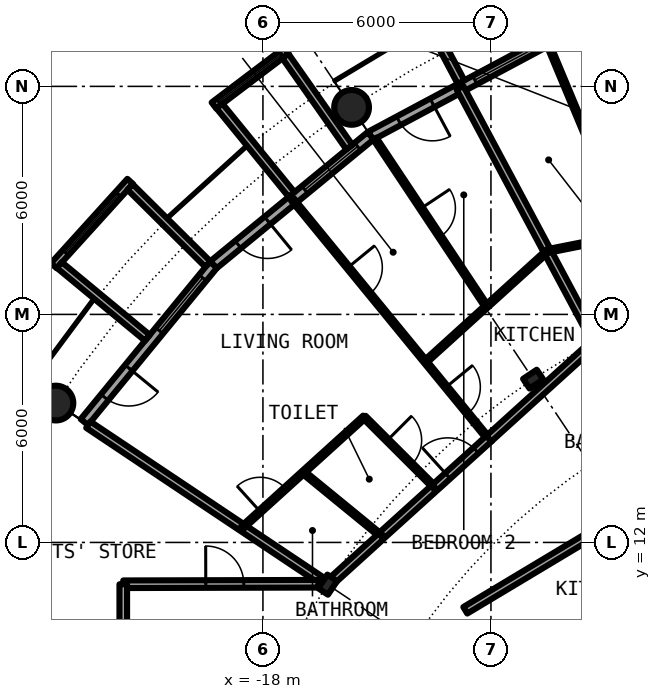
"""IFC4 building model, lengths in metres.
Left out: names, types, materials, properties, quantities, classifications, styles, units other than length and angle.
Written with IfcOpenShell. Run it as: python <this file> out.ifc"""

import sys

from ifc_helpers import new_model, si_unit, direction, frame, frame_2d, origin, origin_2d, place, context, subcontext, project, spatial, rectangle, circle, hollow_circle, i_section, extrude, element, fill, save


model = new_model("IFC4")
c1 = context("Model", 3, precision=1e-05, world=origin(), true_north=direction((0.0, 1.0)))
c2 = subcontext(c1, "Body", "Model", "MODEL_VIEW")
j1 = project(units=[si_unit("LENGTHUNIT", "METRE"), si_unit("PLANEANGLEUNIT", "RADIAN")], contexts=[c1])
p1 = place(None, origin())
s1 = spatial("IfcSite", under=j1, at=p1, CompositionType="ELEMENT")
p2 = place(p1, origin())
s2 = spatial("IfcBuilding", under=s1, at=p2, CompositionType="ELEMENT")
p3 = place(p2, frame((0.0, 0.0, 129.95)))
s3 = spatial("IfcBuildingStorey", under=s2, at=p3, CompositionType="ELEMENT", Elevation=129.95)
for number, where, z_axis, x_axis in (
    (1, (-15.667, 23.448, 0.0), (0.0, 0.0, 1.0), (1.0, 0.0, 0.0)),
    (2, (-23.448, 15.667, 0.0), (0.0, 0.0, 1.0), (1.0, 0.0, 0.0)),
):
    element("IfcColumn", number, at=place(p3, frame(where, z_axis=z_axis, x_axis=x_axis)), inside=s3, PredefinedType="COLUMN", context=c2, shape_type="SweptSolid", body=[
        extrude(hollow_circle(Radius=0.457, WallThickness=0.04, at=origin_2d()), origin(), (0.0, 0.0, 1.0), 3.05),
    ])
for number, where, z_axis, x_axis in (
    (3, (-10.889, 16.297, 0.0), (0.0, 0.0, 1.0), (-0.556, 0.831, 0.0)),
    (4, (-16.297, 10.889, 0.0), (0.0, 0.0, 1.0), (-0.831, 0.556, 0.0)),
):
    element("IfcColumn", number, at=place(p3, frame(where, z_axis=z_axis, x_axis=x_axis)), inside=s3, PredefinedType="COLUMN", context=c2, shape_type="SweptSolid", body=[
        extrude(i_section(OverallWidth=0.307, OverallDepth=0.432, WebThickness=0.021, FlangeThickness=0.04, FilletRadius=0.027, at=origin_2d()), origin(), (0.0, 0.0, 1.0), 3.05),
    ])
p4 = place(p3, frame((-10.447, 25.222, 0.0), z_axis=(0.0, 0.0, 1.0), x_axis=(-0.881915646801, -0.471407246368, 0.0)))
e5 = element("IfcWall", 5, at=p4, inside=s3, PredefinedType="SOLIDWALL", context=c2, shape_type="SweptSolid", body=[
    extrude(rectangle(XDim=5.352, YDim=0.25, at=frame_2d((2.676, 0.0))), origin(), (0.0, 0.0, 1.0), 2.7),
])
p5 = place(p4, frame((0.441, 0.0, 0.3)))
e6 = element("IfcOpeningElement", 6, at=p5, cuts=e5, PredefinedType="OPENING", context=c2, shape_type="SweptSolid", body=[
    extrude(rectangle(XDim=1.8, YDim=2.1, at=frame_2d((0.9, 1.05))), frame((0.0, 0.135, 0.0), z_axis=(0.0, -1.0, 0.0), x_axis=(1.0, 0.0, 0.0)), (0.0, 0.0, 1.0), 0.27),
])
p6 = place(p4, frame((3.51, 0.0, 0.0)))
e7 = element("IfcOpeningElement", 7, at=p6, cuts=e5, PredefinedType="OPENING", context=c2, shape_type="SweptSolid", body=[
    extrude(rectangle(XDim=1.0, YDim=2.2, at=frame_2d((0.5, 1.1))), frame((0.0, 0.135, 0.0), z_axis=(0.0, -1.0, 0.0), x_axis=(1.0, 0.0, 0.0)), (0.0, 0.0, 1.0), 0.27),
])
p7 = place(p3, frame((-12.787, 24.113, -0.03), z_axis=(0.0, 0.0, 1.0), x_axis=(-0.468365282436, 0.883534924159, 0.0)))
e8 = element("IfcWall", 8, at=p7, inside=s3, PredefinedType="SOLIDWALL", context=c2, shape_type="SweptSolid", body=[
    extrude(rectangle(XDim=3.006, YDim=0.2, at=frame_2d((1.503, 0.0))), origin(), (0.0, 0.0, 1.0), 2.73),
])
p8 = place(p3, frame((-15.167, 22.699, 0.0), z_axis=(0.0, 0.0, 1.0), x_axis=(-0.773019449054, -0.634382322723, 0.0)))
e9 = element("IfcWall", 9, at=p8, inside=s3, PredefinedType="SOLIDWALL", context=c2, shape_type="SweptSolid", body=[
    extrude(rectangle(XDim=5.352, YDim=0.25, at=frame_2d((2.676, 0.0))), origin(), (0.0, 0.0, 1.0), 2.7),
])
p9 = place(p8, frame((0.441, 0.0, 0.3)))
e10 = element("IfcOpeningElement", 10, at=p9, cuts=e9, PredefinedType="OPENING", context=c2, shape_type="SweptSolid", body=[
    extrude(rectangle(XDim=1.8, YDim=2.1, at=frame_2d((0.9, 1.05))), frame((0.0, 0.135, 0.0), z_axis=(0.0, -1.0, 0.0), x_axis=(1.0, 0.0, 0.0)), (0.0, 0.0, 1.0), 0.27),
])
p10 = place(p8, frame((3.51, 0.0, 0.0)))
e11 = element("IfcOpeningElement", 11, at=p10, cuts=e9, PredefinedType="OPENING", context=c2, shape_type="SweptSolid", body=[
    extrude(rectangle(XDim=1.0, YDim=2.2, at=frame_2d((0.5, 1.1))), frame((0.0, 0.135, 0.0), z_axis=(0.0, -1.0, 0.0), x_axis=(1.0, 0.0, 0.0)), (0.0, 0.0, 1.0), 0.27),
])
p11 = place(p3, frame((-17.382, 24.94, -0.03), z_axis=(0.0, 0.0, 1.0), x_axis=(-0.797456837111, -0.603375996329, 0.0)))
e12 = element("IfcWall", 12, at=p11, inside=s3, PredefinedType="SOLIDWALL", context=c2, shape_type="SweptSolid", body=[
    extrude(rectangle(XDim=2.391, YDim=0.2, at=frame_2d((1.196, 0.0))), origin(), (0.0, 0.0, 1.0), 2.73),
])
p12 = place(p11, frame((0.156, 0.0, 0.33)))
e13 = element("IfcOpeningElement", 13, at=p12, cuts=e12, PredefinedType="OPENING", context=c2, shape_type="SweptSolid", body=[
    extrude(circle(Radius=1.04, at=frame_2d((1.04, 1.04))), frame((0.0, 0.11, 0.0), z_axis=(0.0, -1.0, 0.0), x_axis=(1.0, 0.0, 0.0)), (0.0, 0.0, 1.0), 0.22),
])
p13 = place(p3, frame((-15.726, 22.402, -0.03), z_axis=(0.0, 0.0, 1.0), x_axis=(-0.574826383135, 0.818275399393, 0.0)))
e14 = element("IfcWall", 14, at=p13, inside=s3, PredefinedType="SOLIDWALL", context=c2, shape_type="SweptSolid", body=[
    extrude(rectangle(XDim=2.929, YDim=0.2, at=frame_2d((1.465, 0.0))), origin(), (0.0, 0.0, 1.0), 2.73),
])
p14 = place(p3, frame((-17.246, 21.155, -0.03), z_axis=(0.0, 0.0, 1.0), x_axis=(-0.631741648902, 0.775179004516, 0.0)))
e15 = element("IfcWall", 15, at=p14, inside=s3, PredefinedType="SOLIDWALL", context=c2, shape_type="SweptSolid", body=[
    extrude(rectangle(XDim=3.006, YDim=0.2, at=frame_2d((1.503, 0.0))), origin(), (0.0, 0.0, 1.0), 2.73),
])
p15 = place(p3, frame((-19.304, 19.304, 0.0), z_axis=(0.0, 0.0, 1.0), x_axis=(-0.634382322723, -0.773019449054, 0.0)))
e16 = element("IfcWall", 16, at=p15, inside=s3, PredefinedType="SOLIDWALL", context=c2, shape_type="SweptSolid", body=[
    extrude(rectangle(XDim=5.352, YDim=0.25, at=frame_2d((2.676, 0.0))), origin(), (0.0, 0.0, 1.0), 2.7),
])
p16 = place(p15, frame((0.441, 0.0, 0.3)))
e17 = element("IfcOpeningElement", 17, at=p16, cuts=e16, PredefinedType="OPENING", context=c2, shape_type="SweptSolid", body=[
    extrude(rectangle(XDim=1.8, YDim=2.1, at=frame_2d((0.9, 1.05))), frame((0.0, 0.135, 0.0), z_axis=(0.0, -1.0, 0.0), x_axis=(1.0, 0.0, 0.0)), (0.0, 0.0, 1.0), 0.27),
])
p17 = place(p15, frame((3.51, 0.0, 0.0)))
e18 = element("IfcOpeningElement", 18, at=p17, cuts=e16, PredefinedType="OPENING", context=c2, shape_type="SweptSolid", body=[
    extrude(rectangle(XDim=1.0, YDim=2.2, at=frame_2d((0.5, 1.1))), frame((0.0, 0.135, 0.0), z_axis=(0.0, -1.0, 0.0), x_axis=(1.0, 0.0, 0.0)), (0.0, 0.0, 1.0), 0.27),
])
p18 = place(p3, frame((-21.493, 21.5, -0.03), z_axis=(0.0, 0.0, 1.0), x_axis=(-0.671506829416, -0.740998365753, 0.0)))
e19 = element("IfcWall", 19, at=p18, inside=s3, PredefinedType="SOLIDWALL", context=c2, shape_type="SweptSolid", body=[
    extrude(rectangle(XDim=2.993, YDim=0.2, at=frame_2d((1.497, 0.0))), origin(), (0.0, 0.0, 1.0), 2.73),
])
p19 = place(p18, frame((0.457, 0.0, 0.33)))
e20 = element("IfcOpeningElement", 20, at=p19, cuts=e19, PredefinedType="OPENING", context=c2, shape_type="SweptSolid", body=[
    extrude(circle(Radius=1.04, at=frame_2d((1.04, 1.04))), frame((0.0, 0.11, 0.0), z_axis=(0.0, -1.0, 0.0), x_axis=(1.0, 0.0, 0.0)), (0.0, 0.0, 1.0), 0.22),
])
p20 = place(p3, frame((-19.45, 19.323, -0.03), z_axis=(0.0, 0.0, 1.0), x_axis=(-0.709727076896, 0.704476739375, 0.0)))
e21 = element("IfcWall", 21, at=p20, inside=s3, PredefinedType="SOLIDWALL", context=c2, shape_type="SweptSolid", body=[
    extrude(rectangle(XDim=2.883, YDim=0.2, at=frame_2d((1.441, 0.0))), origin(), (0.0, 0.0, 1.0), 2.73),
])
p21 = place(p3, frame((-21.041, 17.384, -0.03), z_axis=(0.0, 0.0, 1.0), x_axis=(-0.770784861449, 0.63709551667, 0.0)))
e22 = element("IfcWall", 22, at=p21, inside=s3, PredefinedType="SOLIDWALL", context=c2, shape_type="SweptSolid", body=[
    extrude(rectangle(XDim=3.006, YDim=0.2, at=frame_2d((1.503, 0.0))), origin(), (0.0, 0.0, 1.0), 2.73),
])
p22 = place(p3, frame((-22.595, 15.098, 0.0), z_axis=(0.0, 0.0, 1.0), x_axis=(0.831406593008, -0.555664536482, 0.0)))
e23 = element("IfcWall", 23, at=p22, inside=s3, PredefinedType="PARTITIONING", context=c2, shape_type="SweptSolid", body=[
    extrude(rectangle(XDim=7.358, YDim=0.2, at=frame_2d((3.679, 0.0))), origin(), (0.0, 0.0, 1.0), 2.7),
])
p23 = place(p3, frame((-17.221, 21.022, 0.0), z_axis=(0.0, 0.0, 1.0), x_axis=(0.633735868108, -0.773549513266, 0.0)))
e24 = element("IfcWall", 24, at=p23, inside=s3, PredefinedType="PARTITIONING", context=c2, shape_type="SweptSolid", body=[
    extrude(rectangle(XDim=8.139, YDim=0.1, at=frame_2d((4.069, 0.0))), origin(), (0.0, 0.0, 1.0), 2.7),
])
p24 = place(p23, frame((6.378, 0.0, 0.0)))
e25 = element("IfcOpeningElement", 25, at=p24, cuts=e24, PredefinedType="OPENING", context=c2, shape_type="SweptSolid", body=[
    extrude(rectangle(XDim=0.9, YDim=2.3, at=frame_2d((0.45, 1.15))), frame((0.0, 0.06, 0.0), z_axis=(0.0, -1.0, 0.0), x_axis=(1.0, 0.0, 0.0)), (0.0, 0.0, 1.0), 0.12),
])
p25 = place(p23, frame((2.308, 0.0, 0.0)))
e26 = element("IfcOpeningElement", 26, at=p25, cuts=e24, PredefinedType="OPENING", context=c2, shape_type="SweptSolid", body=[
    extrude(rectangle(XDim=0.9, YDim=2.3, at=frame_2d((0.45, 1.15))), frame((0.0, 0.06, 0.0), z_axis=(0.0, -1.0, 0.0), x_axis=(1.0, 0.0, 0.0)), (0.0, 0.0, 1.0), 0.12),
])
p26 = place(p3, frame((-16.936, 13.845, 0.0), z_axis=(0.0, 0.0, 1.0), x_axis=(0.774162545943, -0.632986850147, 0.0)))
e27 = element("IfcWall", 27, at=p26, inside=s3, PredefinedType="PARTITIONING", context=c2, shape_type="SweptSolid", body=[
    extrude(rectangle(XDim=2.649, YDim=0.1, at=frame_2d((1.325, 0.0))), origin(), (0.0, 0.0, 1.0), 2.7),
])
p27 = place(p3, frame((-15.333, 15.297, 0.0), z_axis=(0.0, 0.0, 1.0), x_axis=(0.707851299421, -0.706361478217, 0.0)))
e28 = element("IfcWall", 28, at=p27, inside=s3, PredefinedType="PARTITIONING", context=c2, shape_type="SweptSolid", body=[
    extrude(rectangle(XDim=2.622, YDim=0.1, at=frame_2d((1.311, 0.0))), origin(), (0.0, 0.0, 1.0), 2.7),
])
p28 = place(p27, frame((0.861, 0.0, 0.0)))
e29 = element("IfcOpeningElement", 29, at=p28, cuts=e28, PredefinedType="OPENING", context=c2, shape_type="SweptSolid", body=[
    extrude(rectangle(XDim=0.9, YDim=2.3, at=frame_2d((0.45, 1.15))), frame((0.0, 0.06, 0.0), z_axis=(0.0, -1.0, 0.0), x_axis=(1.0, 0.0, 0.0)), (0.0, 0.0, 1.0), 0.12),
])
p29 = place(p3, frame((-15.054, 22.624, 0.0), z_axis=(0.0, 0.0, 1.0), x_axis=(0.553913391217, -0.832574294, 0.0)))
e30 = element("IfcWall", 30, at=p29, inside=s3, PredefinedType="PARTITIONING", context=c2, shape_type="SweptSolid", body=[
    extrude(rectangle(XDim=5.301, YDim=0.1, at=frame_2d((2.65, 0.0))), origin(), (0.0, 0.0, 1.0), 2.7),
])
p30 = place(p29, frame((2.2, 0.0, 0.0)))
e31 = element("IfcOpeningElement", 31, at=p30, cuts=e30, PredefinedType="OPENING", context=c2, shape_type="SweptSolid", body=[
    extrude(rectangle(XDim=0.9, YDim=2.3, at=frame_2d((0.45, 1.15))), frame((0.0, 0.06, 0.0), z_axis=(0.0, -1.0, 0.0), x_axis=(1.0, 0.0, 0.0)), (0.0, 0.0, 1.0), 0.12),
])
p31 = place(p3, frame((-12.815, 23.963, 0.0), z_axis=(0.0, 0.0, 1.0), x_axis=(0.471506520577, -0.881862574925, 0.0)))
e32 = element("IfcWall", 32, at=p31, inside=s3, PredefinedType="PARTITIONING", context=c2, shape_type="SweptSolid", body=[
    extrude(rectangle(XDim=7.574, YDim=0.2, at=frame_2d((3.787, 0.0))), origin(), (0.0, 0.0, 1.0), 2.7),
])
p32 = place(p3, frame((-10.479, 25.073, 0.0), z_axis=(0.0, 0.0, 1.0), x_axis=(0.385542476694, -0.922690088093, 0.0)))
e33 = element("IfcWall", 33, at=p32, inside=s3, PredefinedType="PARTITIONING", context=c2, shape_type="SweptSolid", body=[
    extrude(rectangle(XDim=5.403, YDim=0.1, at=frame_2d((2.701, 0.0))), origin(), (0.0, 0.0, 1.0), 2.7),
])
p33 = place(p32, frame((2.251, 0.0, 0.0)))
e34 = element("IfcOpeningElement", 34, at=p33, cuts=e33, PredefinedType="OPENING", context=c2, shape_type="SweptSolid", body=[
    extrude(rectangle(XDim=0.9, YDim=2.3, at=frame_2d((0.45, 1.15))), frame((0.0, 0.06, 0.0), z_axis=(0.0, -1.0, 0.0), x_axis=(1.0, 0.0, 0.0)), (0.0, 0.0, 1.0), 0.12),
])
p34 = place(p3, frame((-21.675, 10.9, 0.0), z_axis=(0.0, 0.0, 1.0), x_axis=(0.99999670426, 0.002567385634, 0.0)))
e35 = element("IfcWall", 35, at=p34, inside=s3, PredefinedType="PARTITIONING", context=c2, shape_type="SweptSolid", body=[
    extrude(rectangle(XDim=5.135, YDim=0.2, at=frame_2d((2.567, 0.0))), origin(), (0.0, 0.0, 1.0), 2.7),
])
p35 = place(p34, frame((2.171, 0.0, 0.0)))
e36 = element("IfcOpeningElement", 36, at=p35, cuts=e35, PredefinedType="OPENING", context=c2, shape_type="SweptSolid", body=[
    extrude(rectangle(XDim=1.0, YDim=2.3, at=frame_2d((0.5, 1.15))), frame((0.0, 0.11, 0.0), z_axis=(0.0, -1.0, 0.0), x_axis=(1.0, 0.0, 0.0)), (0.0, 0.0, 1.0), 0.22),
])
p36 = place(p3, frame((-9.623, 9.195, 0.0), z_axis=(0.0, 0.0, 1.0), x_axis=(0.857574416464, 0.514359913122, 0.0)))
e37 = element("IfcWall", 37, at=p36, inside=s3, PredefinedType="PARTITIONING", context=c2, shape_type="SweptSolid", body=[
    extrude(rectangle(XDim=5.551, YDim=0.1, at=frame_2d((2.775, 0.0))), origin(), (0.0, 0.0, 1.0), 2.7),
])
p37 = place(p3, frame((-12.675, 10.215, 0.0), z_axis=(0.0, 0.0, 1.0), x_axis=(0.85772761283, 0.514104407867, 0.0)))
e38 = element("IfcWall", 38, at=p37, inside=s3, PredefinedType="PARTITIONING", context=c2, shape_type="SweptSolid", body=[
    extrude(rectangle(XDim=12.846, YDim=0.2, at=frame_2d((6.423, 0.0))), origin(), (0.0, 0.0, 1.0), 2.7),
])
p38 = place(p37, frame((7.529, 0.0, 0.0)))
e39 = element("IfcOpeningElement", 39, at=p38, cuts=e38, PredefinedType="OPENING", context=c2, shape_type="SweptSolid", body=[
    extrude(rectangle(XDim=1.0, YDim=2.3, at=frame_2d((0.5, 1.15))), frame((0.0, 0.11, 0.0), z_axis=(0.0, -1.0, 0.0), x_axis=(1.0, 0.0, 0.0)), (0.0, 0.0, 1.0), 0.22),
])
p39 = place(p3, frame((-16.179, 10.995, 0.0), z_axis=(0.0, 0.0, 1.0), x_axis=(0.74092608219, 0.671586584687, 0.0)))
e40 = element("IfcWall", 40, at=p39, inside=s3, PredefinedType="PARTITIONING", context=c2, shape_type="SweptSolid", body=[
    extrude(rectangle(XDim=1.746, YDim=0.2, at=frame_2d((0.873, 0.0))), origin(), (0.0, 0.0, 1.0), 2.39),
])
p40 = place(p3, frame((-14.855, 12.201, 0.0), z_axis=(0.0, 0.0, 1.0), x_axis=(0.742026993487, 0.670370003011, 0.0)))
e41 = element("IfcWall", 41, at=p40, inside=s3, PredefinedType="PARTITIONING", context=c2, shape_type="SweptSolid", body=[
    extrude(rectangle(XDim=1.812, YDim=0.2, at=frame_2d((0.906, 0.0))), origin(), (0.0, 0.0, 1.0), 2.39),
])
p41 = place(p3, frame((-13.474, 13.448, 0.0), z_axis=(0.0, 0.0, 1.0), x_axis=(0.742096578776, 0.670292971595, 0.0)))
e42 = element("IfcWall", 42, at=p41, inside=s3, PredefinedType="PARTITIONING", context=c2, shape_type="SweptSolid", body=[
    extrude(rectangle(XDim=1.938, YDim=0.2, at=frame_2d((0.969, 0.0))), origin(), (0.0, 0.0, 1.0), 2.7),
])
p42 = place(p41, frame((0.453, 0.0, 0.0)))
e43 = element("IfcOpeningElement", 43, at=p42, cuts=e42, PredefinedType="OPENING", context=c2, shape_type="SweptSolid", body=[
    extrude(rectangle(XDim=1.0, YDim=2.3, at=frame_2d((0.5, 1.15))), frame((0.0, 0.11, 0.0), z_axis=(0.0, -1.0, 0.0), x_axis=(1.0, 0.0, 0.0)), (0.0, 0.0, 1.0), 0.22),
])
p43 = place(p3, frame((-12.056, 14.731, 0.0), z_axis=(0.0, 0.0, 1.0), x_axis=(0.74113339149, 0.671357800296, 0.0)))
e44 = element("IfcWall", 44, at=p43, inside=s3, PredefinedType="PARTITIONING", context=c2, shape_type="SweptSolid", body=[
    extrude(rectangle(XDim=3.81, YDim=0.2, at=frame_2d((1.905, 0.0))), origin(), (0.0, 0.0, 1.0), 2.7),
])
p44 = place(p3, frame((-10.513, 19.667, 0.0), z_axis=(0.0, 0.0, 1.0), x_axis=(0.980783231687, 0.195100621324, 0.0)))
e45 = element("IfcWall", 45, at=p44, inside=s3, PredefinedType="PARTITIONING", context=c2, shape_type="SweptSolid", body=[
    extrude(rectangle(XDim=6.473, YDim=0.1, at=frame_2d((3.237, 0.0))), origin(), (0.0, 0.0, 1.0), 2.7),
])
p45 = place(p3, frame((-18.54, 12.392, 0.0), z_axis=(0.0, 0.0, 1.0), x_axis=(0.741109646243, 0.671384012504, 0.0)))
e46 = element("IfcWall", 46, at=p45, inside=s3, PredefinedType="PARTITIONING", context=c2, shape_type="SweptSolid", body=[
    extrude(rectangle(XDim=4.331, YDim=0.1, at=frame_2d((2.166, 0.0))), origin(), (0.0, 0.0, 1.0), 2.7),
])
p46 = place(p45, frame((0.629, 0.0, 0.0)))
e47 = element("IfcOpeningElement", 47, at=p46, cuts=e46, PredefinedType="OPENING", context=c2, shape_type="SweptSolid", body=[
    extrude(rectangle(XDim=0.9, YDim=2.3, at=frame_2d((0.45, 1.15))), frame((0.0, 0.06, 0.0), z_axis=(0.0, -1.0, 0.0), x_axis=(1.0, 0.0, 0.0)), (0.0, 0.0, 1.0), 0.12),
])
p47 = place(p3, frame((-13.724, 16.755, 0.0), z_axis=(0.0, 0.0, 1.0), x_axis=(0.741022791884, 0.671479874537, 0.0)))
e48 = element("IfcWall", 48, at=p47, inside=s3, PredefinedType="PARTITIONING", context=c2, shape_type="SweptSolid", body=[
    extrude(rectangle(XDim=4.343, YDim=0.1, at=frame_2d((2.171, 0.0))), origin(), (0.0, 0.0, 1.0), 2.7),
])
p48 = place(p3, frame((-21.675, 9.2, 0.0), z_axis=(0.0, 0.0, 1.0), x_axis=(0.0, 1.0, 0.0)))
e49 = element("IfcWall", 49, at=p48, inside=s3, PredefinedType="PARTITIONING", context=c2, shape_type="SweptSolid", body=[
    extrude(rectangle(XDim=1.7, YDim=0.2, at=frame_2d((0.85, 0.0))), origin(), (0.0, 0.0, 1.0), 2.7),
])
p49 = place(p5, origin())
e50 = element("IfcWindow", 50, at=p49, inside=s3, PartitioningType="SINGLE_PANEL", PredefinedType="WINDOW", context=c2, shape_type="SweptSolid", body=[
    extrude(rectangle(XDim=1.8, YDim=2.1, at=frame_2d((0.9, 1.05))), frame((0.0, 0.03, 0.0), z_axis=(0.0, -1.0, 0.0), x_axis=(1.0, 0.0, 0.0)), (0.0, 0.0, 1.0), 0.06),
])
fill(e6, e50)
p50 = place(p6, origin())
e51 = element("IfcDoor", 51, at=p50, inside=s3, OperationType="SINGLE_SWING_LEFT", PredefinedType="DOOR", context=c2, shape_type="SweptSolid", body=[
    extrude(rectangle(XDim=1.0, YDim=2.2, at=frame_2d((0.5, 1.1))), frame((0.0, 0.025, 0.0), z_axis=(0.0, -1.0, 0.0), x_axis=(1.0, 0.0, 0.0)), (0.0, 0.0, 1.0), 0.05),
])
fill(e7, e51)
p51 = place(p9, origin())
e52 = element("IfcWindow", 52, at=p51, inside=s3, PartitioningType="SINGLE_PANEL", PredefinedType="WINDOW", context=c2, shape_type="SweptSolid", body=[
    extrude(rectangle(XDim=1.8, YDim=2.1, at=frame_2d((0.9, 1.05))), frame((0.0, 0.03, 0.0), z_axis=(0.0, -1.0, 0.0), x_axis=(1.0, 0.0, 0.0)), (0.0, 0.0, 1.0), 0.06),
])
fill(e10, e52)
p52 = place(p12, origin())
e53 = element("IfcWindow", 53, at=p52, inside=s3, PartitioningType="SINGLE_PANEL", PredefinedType="WINDOW", context=c2, shape_type="SweptSolid", body=[
    extrude(circle(Radius=1.04, at=frame_2d((1.04, 1.04))), frame((0.0, 0.03, 0.0), z_axis=(0.0, -1.0, 0.0), x_axis=(1.0, 0.0, 0.0)), (0.0, 0.0, 1.0), 0.06),
])
fill(e13, e53)
p53 = place(p10, origin())
e54 = element("IfcDoor", 54, at=p53, inside=s3, OperationType="SINGLE_SWING_LEFT", PredefinedType="DOOR", context=c2, shape_type="SweptSolid", body=[
    extrude(rectangle(XDim=1.0, YDim=2.2, at=frame_2d((0.5, 1.1))), frame((0.0, 0.025, 0.0), z_axis=(0.0, -1.0, 0.0), x_axis=(1.0, 0.0, 0.0)), (0.0, 0.0, 1.0), 0.05),
])
fill(e11, e54)
p54 = place(p16, origin())
e55 = element("IfcWindow", 55, at=p54, inside=s3, PartitioningType="SINGLE_PANEL", PredefinedType="WINDOW", context=c2, shape_type="SweptSolid", body=[
    extrude(rectangle(XDim=1.8, YDim=2.1, at=frame_2d((0.9, 1.05))), frame((0.0, 0.03, 0.0), z_axis=(0.0, -1.0, 0.0), x_axis=(1.0, 0.0, 0.0)), (0.0, 0.0, 1.0), 0.06),
])
fill(e17, e55)
p55 = place(p19, origin())
e56 = element("IfcWindow", 56, at=p55, inside=s3, PartitioningType="SINGLE_PANEL", PredefinedType="WINDOW", context=c2, shape_type="SweptSolid", body=[
    extrude(circle(Radius=1.04, at=frame_2d((1.04, 1.04))), frame((0.0, 0.03, 0.0), z_axis=(0.0, -1.0, 0.0), x_axis=(1.0, 0.0, 0.0)), (0.0, 0.0, 1.0), 0.06),
])
fill(e20, e56)
p56 = place(p17, origin())
e57 = element("IfcDoor", 57, at=p56, inside=s3, OperationType="SINGLE_SWING_LEFT", PredefinedType="DOOR", context=c2, shape_type="SweptSolid", body=[
    extrude(rectangle(XDim=1.0, YDim=2.2, at=frame_2d((0.5, 1.1))), frame((0.0, 0.025, 0.0), z_axis=(0.0, -1.0, 0.0), x_axis=(1.0, 0.0, 0.0)), (0.0, 0.0, 1.0), 0.05),
])
fill(e18, e57)
p57 = place(p33, origin())
e58 = element("IfcDoor", 58, at=p57, inside=s3, OperationType="SINGLE_SWING_RIGHT", PredefinedType="DOOR", context=c2, shape_type="SweptSolid", body=[
    extrude(rectangle(XDim=0.9, YDim=2.3, at=frame_2d((0.45, 1.15))), frame((0.0, 0.025, 0.0), z_axis=(0.0, -1.0, 0.0), x_axis=(1.0, 0.0, 0.0)), (0.0, 0.0, 1.0), 0.05),
])
fill(e34, e58)
p58 = place(p42, origin())
e59 = element("IfcDoor", 59, at=p58, inside=s3, OperationType="SINGLE_SWING_LEFT", PredefinedType="DOOR", context=c2, shape_type="SweptSolid", body=[
    extrude(rectangle(XDim=1.0, YDim=2.3, at=frame_2d((0.5, 1.15))), frame((0.0, 0.025, 0.0), z_axis=(0.0, -1.0, 0.0), x_axis=(1.0, 0.0, 0.0)), (0.0, 0.0, 1.0), 0.05),
])
fill(e43, e59)
p59 = place(p46, origin())
e60 = element("IfcDoor", 60, at=p59, inside=s3, OperationType="SINGLE_SWING_LEFT", PredefinedType="DOOR", context=c2, shape_type="SweptSolid", body=[
    extrude(rectangle(XDim=0.9, YDim=2.3, at=frame_2d((0.45, 1.15))), frame((0.0, 0.025, 0.0), z_axis=(0.0, -1.0, 0.0), x_axis=(1.0, 0.0, 0.0)), (0.0, 0.0, 1.0), 0.05),
])
fill(e47, e60)
p60 = place(p28, origin())
e61 = element("IfcDoor", 61, at=p60, inside=s3, OperationType="SINGLE_SWING_RIGHT", PredefinedType="DOOR", context=c2, shape_type="SweptSolid", body=[
    extrude(rectangle(XDim=0.9, YDim=2.3, at=frame_2d((0.45, 1.15))), frame((0.0, 0.025, 0.0), z_axis=(0.0, -1.0, 0.0), x_axis=(1.0, 0.0, 0.0)), (0.0, 0.0, 1.0), 0.05),
])
fill(e29, e61)
p61 = place(p24, origin())
e62 = element("IfcDoor", 62, at=p61, inside=s3, OperationType="SINGLE_SWING_RIGHT", PredefinedType="DOOR", context=c2, shape_type="SweptSolid", body=[
    extrude(rectangle(XDim=0.9, YDim=2.3, at=frame_2d((0.45, 1.15))), frame((0.0, 0.025, 0.0), z_axis=(0.0, -1.0, 0.0), x_axis=(1.0, 0.0, 0.0)), (0.0, 0.0, 1.0), 0.05),
])
fill(e25, e62)
p62 = place(p25, origin())
e63 = element("IfcDoor", 63, at=p62, inside=s3, OperationType="SINGLE_SWING_LEFT", PredefinedType="DOOR", context=c2, shape_type="SweptSolid", body=[
    extrude(rectangle(XDim=0.9, YDim=2.3, at=frame_2d((0.45, 1.15))), frame((0.0, 0.025, 0.0), z_axis=(0.0, -1.0, 0.0), x_axis=(1.0, 0.0, 0.0)), (0.0, 0.0, 1.0), 0.05),
])
fill(e26, e63)
p63 = place(p30, origin())
e64 = element("IfcDoor", 64, at=p63, inside=s3, OperationType="SINGLE_SWING_LEFT", PredefinedType="DOOR", context=c2, shape_type="SweptSolid", body=[
    extrude(rectangle(XDim=0.9, YDim=2.3, at=frame_2d((0.45, 1.15))), frame((0.0, 0.025, 0.0), z_axis=(0.0, -1.0, 0.0), x_axis=(1.0, 0.0, 0.0)), (0.0, 0.0, 1.0), 0.05),
])
fill(e31, e64)
p64 = place(p35, origin())
e65 = element("IfcDoor", 65, at=p64, inside=s3, OperationType="SINGLE_SWING_RIGHT", PredefinedType="DOOR", context=c2, shape_type="SweptSolid", body=[
    extrude(rectangle(XDim=1.0, YDim=2.3, at=frame_2d((0.5, 1.15))), frame((0.0, 0.025, 0.0), z_axis=(0.0, -1.0, 0.0), x_axis=(1.0, 0.0, 0.0)), (0.0, 0.0, 1.0), 0.05),
])
fill(e36, e65)
save(model, sys.argv[1])
